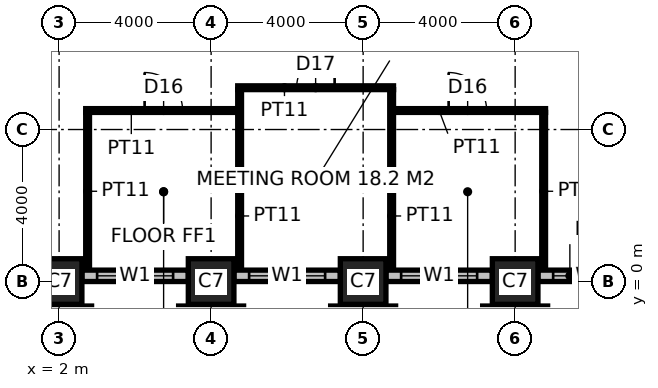
"""IFC4 building model, lengths in metres.
Left out: names, types, materials, properties, quantities, classifications, styles, units other than length and angle.
Written with IfcOpenShell. Run it as: python <this file> out.ifc"""

import sys

from ifc_helpers import new_model, si_unit, direction, frame, frame_2d, origin, origin_2d, place, context, subcontext, project, spatial, rectangle, hollow_rectangle, extrude, element, fill, save


model = new_model("IFC4")
c1 = context("Model", 3, precision=1e-05, world=origin(), true_north=direction((0.0, 1.0)))
c2 = subcontext(c1, "Body", "Model", "MODEL_VIEW")
j1 = project(units=[si_unit("LENGTHUNIT", "METRE"), si_unit("PLANEANGLEUNIT", "RADIAN")], contexts=[c1])
p1 = place(None, origin())
s1 = spatial("IfcSite", under=j1, at=p1, CompositionType="ELEMENT")
p2 = place(p1, origin())
s2 = spatial("IfcBuilding", under=s1, at=p2, CompositionType="ELEMENT")
p3 = place(p2, frame((0.0, 0.0, 59.0)))
s3 = spatial("IfcBuildingStorey", under=s2, at=p3, CompositionType="ELEMENT", Elevation=59.0)
for number, where, z_axis, x_axis in (
    (1, (2.0, 0.0, 0.0), (0.0, 0.0, 1.0), (1.0, 0.0, 0.0)),
    (2, (6.0, 0.0, 0.0), (0.0, 0.0, 1.0), (1.0, 0.0, 0.0)),
    (3, (10.0, 0.0, 0.0), (0.0, 0.0, 1.0), (1.0, 0.0, 0.0)),
    (4, (14.0, 0.0, 0.0), (0.0, 0.0, 1.0), (1.0, 0.0, 0.0)),
):
    element("IfcColumn", number, at=place(p3, frame(where, z_axis=z_axis, x_axis=x_axis)), inside=s3, PredefinedType="COLUMN", context=c2, shape_type="SweptSolid", body=[
        extrude(hollow_rectangle(XDim=1.2, YDim=1.2, WallThickness=0.1, at=origin_2d()), origin(), (0.0, 0.0, 1.0), 4.0),
    ])
p4 = place(p3, frame((2.7, 4.5, 0.0), z_axis=(0.0, 0.0, 1.0), x_axis=(1.0, 0.0, 0.0)))
e5 = element("IfcWall", 5, at=p4, inside=s3, PredefinedType="PARTITIONING", context=c2, shape_type="SweptSolid", body=[
    extrude(rectangle(XDim=4.0, YDim=0.1, at=frame_2d((2.0, 0.0))), origin(), (0.0, 0.0, 1.0), 3.85),
])
p5 = place(p4, frame((1.55, 0.0, 0.0)))
e6 = element("IfcOpeningElement", 6, at=p5, cuts=e5, PredefinedType="OPENING", context=c2, shape_type="SweptSolid", body=[
    extrude(rectangle(XDim=1.0, YDim=2.2, at=frame_2d((0.5, 1.1))), frame((0.0, 0.06, 0.0), z_axis=(0.0, -1.0, 0.0), x_axis=(1.0, 0.0, 0.0)), (0.0, 0.0, 1.0), 0.12),
])
p6 = place(p3, frame((10.8, 4.5, 0.0), z_axis=(0.0, 0.0, 1.0), x_axis=(1.0, 0.0, 0.0)))
e7 = element("IfcWall", 7, at=p6, inside=s3, PredefinedType="PARTITIONING", context=c2, shape_type="SweptSolid", body=[
    extrude(rectangle(XDim=4.0, YDim=0.1, at=frame_2d((2.0, 0.0))), origin(), (0.0, 0.0, 1.0), 3.85),
])
p7 = place(p6, frame((1.45, 0.0, 0.0)))
e8 = element("IfcOpeningElement", 8, at=p7, cuts=e7, PredefinedType="OPENING", context=c2, shape_type="SweptSolid", body=[
    extrude(rectangle(XDim=1.0, YDim=2.2, at=frame_2d((0.5, 1.1))), frame((0.0, 0.06, 0.0), z_axis=(0.0, -1.0, 0.0), x_axis=(1.0, 0.0, 0.0)), (0.0, 0.0, 1.0), 0.12),
])
p8 = place(p3, frame((6.7, 5.1, 0.0), z_axis=(0.0, 0.0, 1.0), x_axis=(1.0, 0.0, 0.0)))
e9 = element("IfcWall", 9, at=p8, inside=s3, PredefinedType="PARTITIONING", context=c2, shape_type="SweptSolid", body=[
    extrude(rectangle(XDim=4.1, YDim=0.1, at=frame_2d((2.05, 0.0))), origin(), (0.0, 0.0, 1.0), 3.85),
])
p9 = place(p8, frame((1.55, 0.0, 0.0)))
e10 = element("IfcOpeningElement", 10, at=p9, cuts=e9, PredefinedType="OPENING", context=c2, shape_type="SweptSolid", body=[
    extrude(rectangle(XDim=1.0, YDim=2.2, at=frame_2d((0.5, 1.1))), frame((0.0, 0.06, 0.0), z_axis=(0.0, -1.0, 0.0), x_axis=(1.0, 0.0, 0.0)), (0.0, 0.0, 1.0), 0.12),
])
p10 = place(p3, frame((2.75, 0.3, 0.0), z_axis=(0.0, 0.0, 1.0), x_axis=(0.0, 1.0, 0.0)))
e11 = element("IfcWall", 11, at=p10, inside=s3, PredefinedType="PARTITIONING", context=c2, shape_type="SweptSolid", body=[
    extrude(rectangle(XDim=4.15, YDim=0.1, at=frame_2d((2.075, 0.0))), origin(), (0.0, 0.0, 1.0), 3.85),
])
for number, where, z_axis, x_axis in (
    (12, (6.75, 0.3, 0.0), (0.0, 0.0, 1.0), (0.0, 1.0, 0.0)),
    (13, (10.75, 0.3, 0.0), (0.0, 0.0, 1.0), (0.0, 1.0, 0.0)),
):
    element("IfcWall", number, at=place(p3, frame(where, z_axis=z_axis, x_axis=x_axis)), inside=s3, PredefinedType="PARTITIONING", context=c2, shape_type="SweptSolid", body=[
        extrude(rectangle(XDim=4.75, YDim=0.1, at=frame_2d((2.375, 0.0))), origin(), (0.0, 0.0, 1.0), 3.85),
    ])
p11 = place(p3, frame((14.75, 0.3, 0.0), z_axis=(0.0, 0.0, 1.0), x_axis=(0.0, 1.0, 0.0)))
e14 = element("IfcWall", 14, at=p11, inside=s3, PredefinedType="PARTITIONING", context=c2, shape_type="SweptSolid", body=[
    extrude(rectangle(XDim=4.15, YDim=0.1, at=frame_2d((2.075, 0.0))), origin(), (0.0, 0.0, 1.0), 3.85),
])
p12 = place(p3, frame((2.6, 0.15, 0.0), z_axis=(0.0, 0.0, 1.0), x_axis=(1.0, 0.0, 0.0)))
e15 = element("IfcWall", 15, at=p12, inside=s3, PredefinedType="ELEMENTEDWALL", context=c2, shape_type="SweptSolid", body=[
    extrude(rectangle(XDim=2.8, YDim=0.3, at=frame_2d((1.4, 0.0))), origin(), (0.0, 0.0, 1.0), 2.85),
])
p13 = place(p12, frame((0.4, 0.0, 0.8)))
e16 = element("IfcOpeningElement", 16, at=p13, cuts=e15, PredefinedType="OPENING", context=c2, shape_type="SweptSolid", body=[
    extrude(rectangle(XDim=2.0, YDim=2.0, at=frame_2d((1.0, 1.0))), frame((0.0, 0.16, 0.0), z_axis=(0.0, -1.0, 0.0), x_axis=(1.0, 0.0, 0.0)), (0.0, 0.0, 1.0), 0.32),
])
p14 = place(p3, frame((6.6, 0.15, 0.0), z_axis=(0.0, 0.0, 1.0), x_axis=(1.0, 0.0, 0.0)))
e17 = element("IfcWall", 17, at=p14, inside=s3, PredefinedType="ELEMENTEDWALL", context=c2, shape_type="SweptSolid", body=[
    extrude(rectangle(XDim=2.8, YDim=0.3, at=frame_2d((1.4, 0.0))), origin(), (0.0, 0.0, 1.0), 2.85),
])
p15 = place(p14, frame((0.4, 0.0, 0.8)))
e18 = element("IfcOpeningElement", 18, at=p15, cuts=e17, PredefinedType="OPENING", context=c2, shape_type="SweptSolid", body=[
    extrude(rectangle(XDim=2.0, YDim=2.0, at=frame_2d((1.0, 1.0))), frame((0.0, 0.16, 0.0), z_axis=(0.0, -1.0, 0.0), x_axis=(1.0, 0.0, 0.0)), (0.0, 0.0, 1.0), 0.32),
])
p16 = place(p3, frame((10.6, 0.15, 0.0), z_axis=(0.0, 0.0, 1.0), x_axis=(1.0, 0.0, 0.0)))
e19 = element("IfcWall", 19, at=p16, inside=s3, PredefinedType="ELEMENTEDWALL", context=c2, shape_type="SweptSolid", body=[
    extrude(rectangle(XDim=2.8, YDim=0.3, at=frame_2d((1.4, 0.0))), origin(), (0.0, 0.0, 1.0), 2.85),
])
p17 = place(p16, frame((0.4, 0.0, 0.8)))
e20 = element("IfcOpeningElement", 20, at=p17, cuts=e19, PredefinedType="OPENING", context=c2, shape_type="SweptSolid", body=[
    extrude(rectangle(XDim=2.0, YDim=2.0, at=frame_2d((1.0, 1.0))), frame((0.0, 0.16, 0.0), z_axis=(0.0, -1.0, 0.0), x_axis=(1.0, 0.0, 0.0)), (0.0, 0.0, 1.0), 0.32),
])
p18 = place(p3, frame((14.6, 0.15, 0.0), z_axis=(0.0, 0.0, 1.0), x_axis=(1.0, 0.0, 0.0)))
e21 = element("IfcWall", 21, at=p18, inside=s3, PredefinedType="ELEMENTEDWALL", context=c2, shape_type="SweptSolid", body=[
    extrude(rectangle(XDim=2.8, YDim=0.3, at=frame_2d((1.4, 0.0))), origin(), (0.0, 0.0, 1.0), 2.85),
])
p19 = place(p18, frame((0.4, 0.0, 0.8)))
e22 = element("IfcOpeningElement", 22, at=p19, cuts=e21, PredefinedType="OPENING", context=c2, shape_type="SweptSolid", body=[
    extrude(rectangle(XDim=2.0, YDim=2.0, at=frame_2d((1.0, 1.0))), frame((0.0, 0.16, 0.0), z_axis=(0.0, -1.0, 0.0), x_axis=(1.0, 0.0, 0.0)), (0.0, 0.0, 1.0), 0.32),
])
p20 = place(p5, origin())
e23 = element("IfcDoor", 23, at=p20, inside=s3, OperationType="SINGLE_SWING_LEFT", PredefinedType="DOOR", context=c2, shape_type="SweptSolid", body=[
    extrude(rectangle(XDim=1.0, YDim=2.2, at=frame_2d((0.5, 1.1))), frame((0.0, 0.025, 0.0), z_axis=(0.0, -1.0, 0.0), x_axis=(1.0, 0.0, 0.0)), (0.0, 0.0, 1.0), 0.05),
])
fill(e6, e23)
p21 = place(p9, origin())
e24 = element("IfcDoor", 24, at=p21, inside=s3, OperationType="SINGLE_SWING_RIGHT", PredefinedType="DOOR", context=c2, shape_type="SweptSolid", body=[
    extrude(rectangle(XDim=1.0, YDim=2.2, at=frame_2d((0.5, 1.1))), frame((0.0, 0.025, 0.0), z_axis=(0.0, -1.0, 0.0), x_axis=(1.0, 0.0, 0.0)), (0.0, 0.0, 1.0), 0.05),
])
fill(e10, e24)
p22 = place(p7, origin())
e25 = element("IfcDoor", 25, at=p22, inside=s3, OperationType="SINGLE_SWING_LEFT", PredefinedType="DOOR", context=c2, shape_type="SweptSolid", body=[
    extrude(rectangle(XDim=1.0, YDim=2.2, at=frame_2d((0.5, 1.1))), frame((0.0, 0.025, 0.0), z_axis=(0.0, -1.0, 0.0), x_axis=(1.0, 0.0, 0.0)), (0.0, 0.0, 1.0), 0.05),
])
fill(e8, e25)
p23 = place(p13, origin())
e26 = element("IfcWindow", 26, at=p23, inside=s3, PartitioningType="SINGLE_PANEL", PredefinedType="WINDOW", context=c2, shape_type="SweptSolid", body=[
    extrude(rectangle(XDim=2.0, YDim=2.0, at=frame_2d((1.0, 1.0))), frame((0.0, 0.03, 0.0), z_axis=(0.0, -1.0, 0.0), x_axis=(1.0, 0.0, 0.0)), (0.0, 0.0, 1.0), 0.06),
])
fill(e16, e26)
p24 = place(p15, origin())
e27 = element("IfcWindow", 27, at=p24, inside=s3, PartitioningType="SINGLE_PANEL", PredefinedType="WINDOW", context=c2, shape_type="SweptSolid", body=[
    extrude(rectangle(XDim=2.0, YDim=2.0, at=frame_2d((1.0, 1.0))), frame((0.0, 0.03, 0.0), z_axis=(0.0, -1.0, 0.0), x_axis=(1.0, 0.0, 0.0)), (0.0, 0.0, 1.0), 0.06),
])
fill(e18, e27)
p25 = place(p17, origin())
e28 = element("IfcWindow", 28, at=p25, inside=s3, PartitioningType="SINGLE_PANEL", PredefinedType="WINDOW", context=c2, shape_type="SweptSolid", body=[
    extrude(rectangle(XDim=2.0, YDim=2.0, at=frame_2d((1.0, 1.0))), frame((0.0, 0.03, 0.0), z_axis=(0.0, -1.0, 0.0), x_axis=(1.0, 0.0, 0.0)), (0.0, 0.0, 1.0), 0.06),
])
fill(e20, e28)
p26 = place(p19, origin())
e29 = element("IfcWindow", 29, at=p26, inside=s3, PartitioningType="SINGLE_PANEL", PredefinedType="WINDOW", context=c2, shape_type="SweptSolid", body=[
    extrude(rectangle(XDim=2.0, YDim=2.0, at=frame_2d((1.0, 1.0))), frame((0.0, 0.03, 0.0), z_axis=(0.0, -1.0, 0.0), x_axis=(1.0, 0.0, 0.0)), (0.0, 0.0, 1.0), 0.06),
])
fill(e22, e29)
save(model, sys.argv[1])
